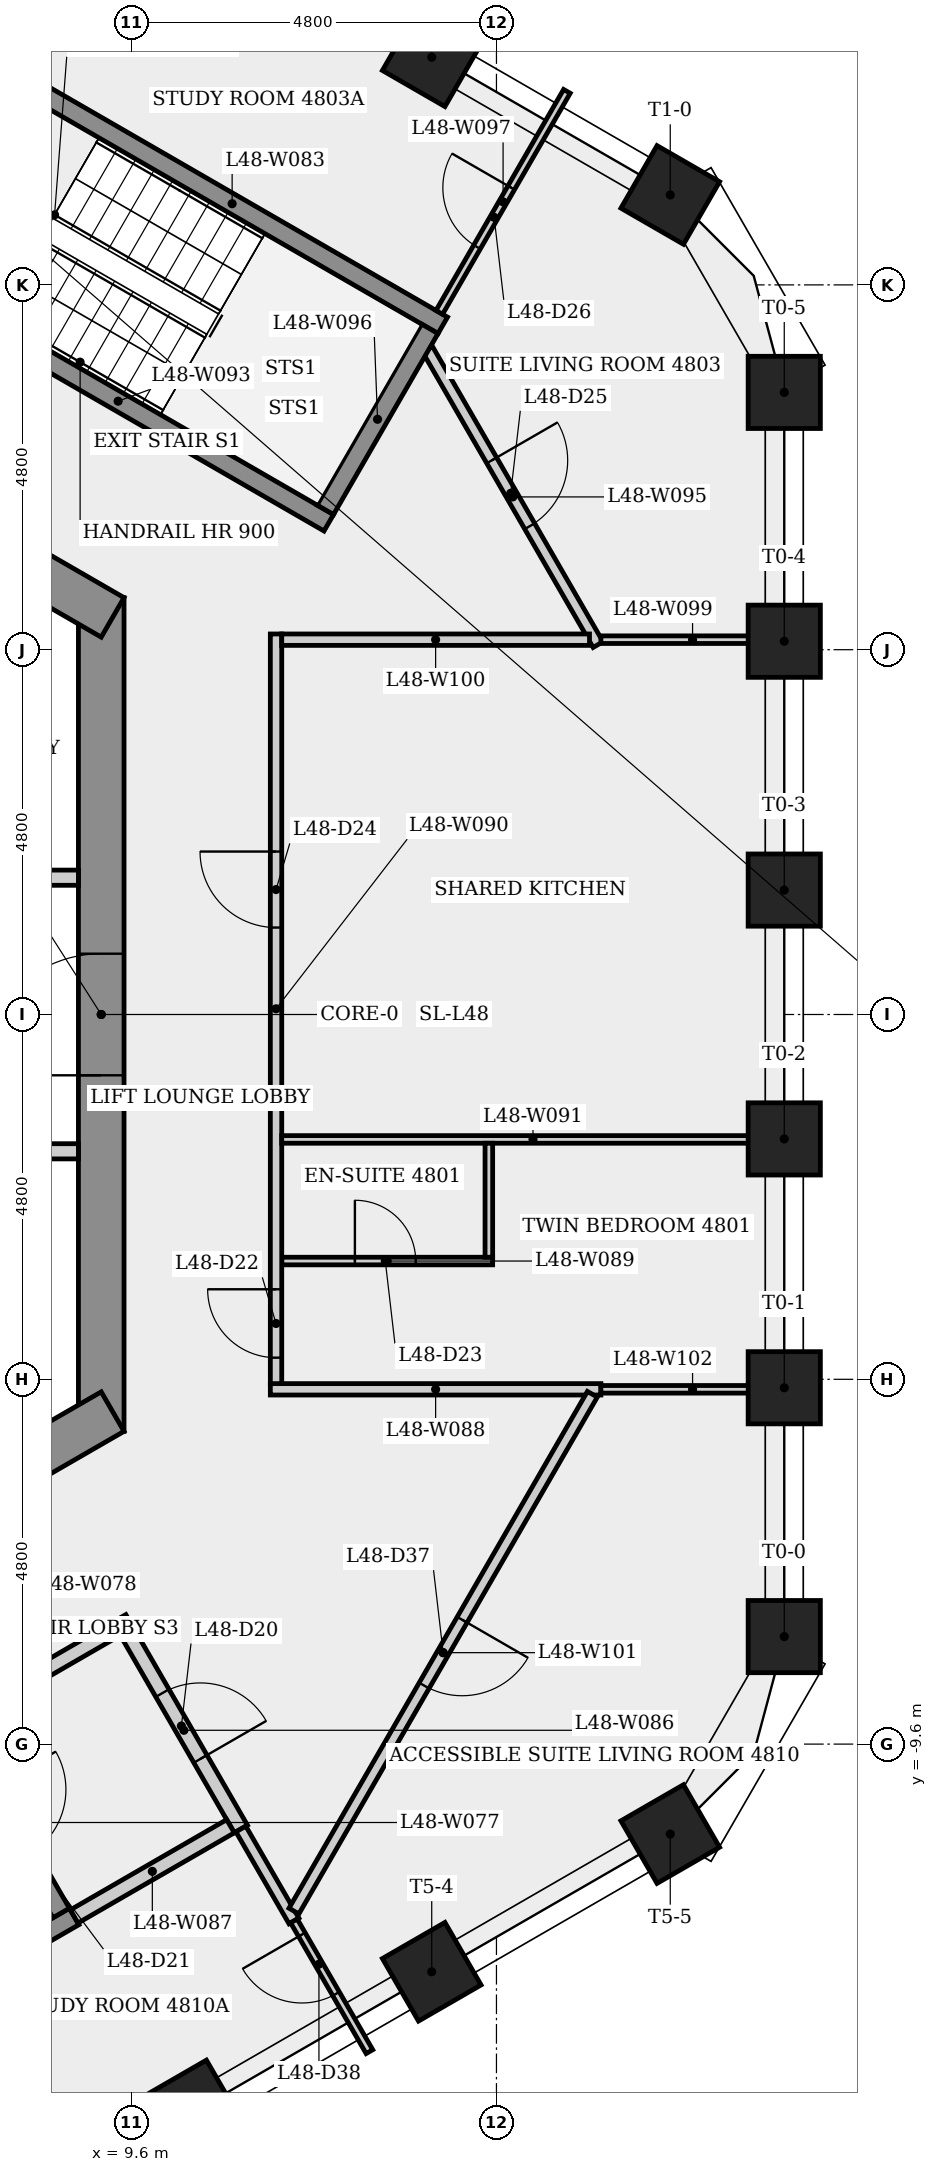
"""IFC4 building model, lengths in metres.
Left out: names, types, materials, properties, quantities, classifications, styles, units other than length and angle.
Written with IfcOpenShell. Run it as: python <this file> out.ifc"""

import sys

from ifc_helpers import new_model, si_unit, direction, frame, frame_2d, origin, origin_2d, place, context, subcontext, project, spatial, rectangle, extrude, element, fill, save


model = new_model("IFC4")
c1 = context("Model", 3, precision=1e-05, world=origin(), true_north=direction((0.0, 1.0)))
c2 = subcontext(c1, "Body", "Model", "MODEL_VIEW")
j1 = project(units=[si_unit("LENGTHUNIT", "METRE"), si_unit("PLANEANGLEUNIT", "RADIAN")], contexts=[c1])
p1 = place(None, origin())
s1 = spatial("IfcSite", under=j1, at=p1, CompositionType="ELEMENT")
p2 = place(p1, origin())
s2 = spatial("IfcBuilding", under=s1, at=p2, CompositionType="ELEMENT")
p3 = place(p2, frame((0.0, 0.0, 179.9)))
s3 = spatial("IfcBuildingStorey", under=s2, at=p3, CompositionType="ELEMENT", Elevation=179.9)
p4 = place(p3, frame((9.2, -5.485, 0.0), z_axis=(0.0, 0.0, 1.0), x_axis=(0.0, 1.0, 0.0)))
e1 = element("IfcWall", 1, at=p4, inside=s3, PredefinedType="SHEAR", context=c2, shape_type="SweptSolid", body=[
    extrude(rectangle(XDim=10.97, YDim=0.6, at=frame_2d((5.485, 0.0))), origin(), (0.0, 0.0, 1.0), 3.4),
])
p5 = place(p4, frame((4.685, 0.0, 0.0)))
e2 = element("IfcOpeningElement", 2, at=p5, cuts=e1, PredefinedType="OPENING", context=c2, shape_type="SweptSolid", body=[
    extrude(rectangle(XDim=1.6, YDim=2.1, at=frame_2d((0.8, 1.05))), frame((0.0, 0.31, 0.0), z_axis=(0.0, -1.0, 0.0), x_axis=(1.0, 0.0, 0.0)), (0.0, 0.0, 1.0), 0.62),
])
p6 = place(p3, frame((9.35, 5.225, 0.0), z_axis=(0.0, 0.0, 1.0), x_axis=(-0.866023993627, 0.500002442456, 0.0)))
e3 = element("IfcWall", 3, at=p6, inside=s3, PredefinedType="SHEAR", context=c2, shape_type="SweptSolid", body=[
    extrude(rectangle(XDim=10.97, YDim=0.6, at=frame_2d((5.485, 0.0))), origin(), (0.0, 0.0, 1.0), 3.4),
])
p7 = place(p6, frame((8.325, 0.0, 0.0)))
e4 = element("IfcOpeningElement", 4, at=p7, cuts=e3, PredefinedType="OPENING", context=c2, shape_type="SweptSolid", body=[
    extrude(rectangle(XDim=0.9, YDim=2.1, at=frame_2d((0.45, 1.05))), frame((0.0, 0.31, 0.0), z_axis=(0.0, -1.0, 0.0), x_axis=(1.0, 0.0, 0.0)), (0.0, 0.0, 1.0), 0.62),
])
p8 = place(p6, frame((1.518, 0.0, 0.0)))
e5 = element("IfcOpeningElement", 5, at=p8, cuts=e3, PredefinedType="OPENING", context=c2, shape_type="SweptSolid", body=[
    extrude(rectangle(XDim=0.9, YDim=2.1, at=frame_2d((0.45, 1.05))), frame((0.0, 0.31, 0.0), z_axis=(0.0, -1.0, 0.0), x_axis=(1.0, 0.0, 0.0)), (0.0, 0.0, 1.0), 0.62),
])
p9 = place(p3, frame((-0.15, -10.71, 0.0), z_axis=(0.0, 0.0, 1.0), x_axis=(0.866023993627, 0.500002442456, 0.0)))
e6 = element("IfcWall", 6, at=p9, inside=s3, PredefinedType="SHEAR", context=c2, shape_type="SweptSolid", body=[
    extrude(rectangle(XDim=10.97, YDim=0.6, at=frame_2d((5.485, 0.0))), origin(), (0.0, 0.0, 1.0), 3.4),
])
p10 = place(p9, frame((1.283, 0.0, 0.0)))
e7 = element("IfcOpeningElement", 7, at=p10, cuts=e6, PredefinedType="OPENING", context=c2, shape_type="SweptSolid", body=[
    extrude(rectangle(XDim=0.9, YDim=2.1, at=frame_2d((0.45, 1.05))), frame((0.0, 0.31, 0.0), z_axis=(0.0, -1.0, 0.0), x_axis=(1.0, 0.0, 0.0)), (0.0, 0.0, 1.0), 0.62),
])
p11 = place(p9, frame((8.09, 0.0, 0.0)))
e8 = element("IfcOpeningElement", 8, at=p11, cuts=e6, PredefinedType="OPENING", context=c2, shape_type="SweptSolid", body=[
    extrude(rectangle(XDim=0.9, YDim=2.1, at=frame_2d((0.45, 1.05))), frame((0.0, 0.31, 0.0), z_axis=(0.0, -1.0, 0.0), x_axis=(1.0, 0.0, 0.0)), (0.0, 0.0, 1.0), 0.62),
])
for number, where, z_axis, x_axis in (
    (9, (18.187, -8.186, 0.0), (0.0, 0.0, 1.0), (1.0, 0.0, 0.0)),
    (10, (18.187, -4.911, 0.0), (0.0, 0.0, 1.0), (1.0, 0.0, 0.0)),
    (11, (18.187, -1.637, 0.0), (0.0, 0.0, 1.0), (1.0, 0.0, 0.0)),
    (12, (18.187, 1.637, 0.0), (0.0, 0.0, 1.0), (1.0, 0.0, 0.0)),
    (13, (18.187, 4.911, 0.0), (0.0, 0.0, 1.0), (1.0, 0.0, 0.0)),
    (14, (18.187, 8.186, 0.0), (0.0, 0.0, 1.0), (1.0, 0.0, 0.0)),
    (15, (16.687, 10.783, 0.0), (0.0, 0.0, 1.0), (0.5, 0.866, 0.0)),
    (16, (13.548, 12.595, 0.0), (0.0, 0.0, 1.0), (0.5, 0.866, 0.0)),
    (17, (10.41, -14.407, 0.0), (0.0, 0.0, 1.0), (0.5, -0.866, 0.0)),
    (18, (13.548, -12.595, 0.0), (0.0, 0.0, 1.0), (0.5, -0.866, 0.0)),
    (19, (16.687, -10.783, 0.0), (0.0, 0.0, 1.0), (0.5, -0.866, 0.0)),
):
    element("IfcColumn", number, at=place(p3, frame(where, z_axis=z_axis, x_axis=x_axis)), inside=s3, PredefinedType="COLUMN", context=c2, shape_type="SweptSolid", body=[
        extrude(rectangle(XDim=0.95, YDim=0.95, at=origin_2d()), origin(), (0.0, 0.0, 1.0), 3.4),
    ])
p12 = place(p3, frame((7.153, -12.989, 0.0), z_axis=(0.0, 0.0, 1.0), x_axis=(0.500009866947, -0.866019707025, 0.0)))
e20 = element("IfcWall", 20, at=p12, inside=s3, PredefinedType="PARTITIONING", context=c2, shape_type="SweptSolid", body=[
    extrude(rectangle(XDim=3.358, YDim=0.1, at=frame_2d((1.679, 0.0))), origin(), (0.0, 0.0, 1.0), 3.05),
])
p13 = place(p3, frame((3.301, -15.068, 0.0), z_axis=(0.0, 0.0, 1.0), x_axis=(0.866035036182, 0.499983315828, 0.0)))
e21 = element("IfcWall", 21, at=p13, inside=s3, PredefinedType="SHEAR", context=c2, shape_type="SweptSolid", body=[
    extrude(rectangle(XDim=6.4, YDim=0.25, at=frame_2d((3.2, 0.0))), origin(), (0.0, 0.0, 1.0), 3.05),
])
p14 = place(p3, frame((7.298, -9.441, 0.0), z_axis=(0.0, 0.0, 1.0), x_axis=(0.500034990121, -0.866005201286, 0.0)))
e22 = element("IfcWall", 22, at=p14, inside=s3, PredefinedType="SHEAR", context=c2, shape_type="SweptSolid", body=[
    extrude(rectangle(XDim=2.75, YDim=0.25, at=frame_2d((1.375, 0.0))), origin(), (0.0, 0.0, 1.0), 3.05),
])
p15 = place(p14, frame((0.875, 0.0, 0.0)))
e23 = element("IfcOpeningElement", 23, at=p15, cuts=e22, PredefinedType="OPENING", context=c2, shape_type="SweptSolid", body=[
    extrude(rectangle(XDim=1.0, YDim=2.1, at=frame_2d((0.5, 1.05))), frame((0.0, 0.135, 0.0), z_axis=(0.0, -1.0, 0.0), x_axis=(1.0, 0.0, 0.0)), (0.0, 0.0, 1.0), 0.27),
])
p16 = place(p3, frame((7.344, -9.27, 0.0), z_axis=(0.0, 0.0, 1.0), x_axis=(0.866005588531, 0.500034319456, 0.0)))
e24 = element("IfcWall", 24, at=p16, inside=s3, PredefinedType="PARTITIONING", context=c2, shape_type="SweptSolid", body=[
    extrude(rectangle(XDim=2.575, YDim=0.2, at=frame_2d((1.288, 0.0))), origin(), (0.0, 0.0, 1.0), 3.05),
])
p17 = place(p3, frame((7.475, 1.8, 0.0), z_axis=(0.0, 0.0, 1.0), x_axis=(1.0, 0.0, 0.0)))
e25 = element("IfcWall", 25, at=p17, inside=s3, PredefinedType="PARTITIONING", context=c2, shape_type="SweptSolid", body=[
    extrude(rectangle(XDim=1.425, YDim=0.2, at=frame_2d((0.712, 0.0))), origin(), (0.0, 0.0, 1.0), 3.05),
])
p18 = place(p3, frame((8.151, 12.268, 0.0), z_axis=(0.0, 0.0, 1.0), x_axis=(0.866025499775, -0.499999833739, 0.0)))
e26 = element("IfcWall", 26, at=p18, inside=s3, PredefinedType="SHEAR", context=c2, shape_type="SweptSolid", body=[
    extrude(rectangle(XDim=6.4, YDim=0.25, at=frame_2d((3.2, 0.0))), origin(), (0.0, 0.0, 1.0), 3.05),
])
p19 = place(p3, frame((8.9, -1.8, 0.0), z_axis=(0.0, 0.0, 1.0), x_axis=(-1.0, 0.0, 0.0)))
e27 = element("IfcWall", 27, at=p19, inside=s3, PredefinedType="PARTITIONING", context=c2, shape_type="SweptSolid", body=[
    extrude(rectangle(XDim=1.425, YDim=0.2, at=frame_2d((0.712, 0.0))), origin(), (0.0, 0.0, 1.0), 3.05),
])
p20 = place(p3, frame((9.537, -8.119, 0.0), z_axis=(0.0, 0.0, 1.0), x_axis=(0.499990139034, -0.866031096941, 0.0)))
e28 = element("IfcWall", 28, at=p20, inside=s3, PredefinedType="PARTITIONING", context=c2, shape_type="SweptSolid", body=[
    extrude(rectangle(XDim=3.0, YDim=0.2, at=frame_2d((1.5, 0.0))), origin(), (0.0, 0.0, 1.0), 3.05),
])
p21 = place(p20, frame((0.935, 0.0, 0.0)))
e29 = element("IfcOpeningElement", 29, at=p21, cuts=e28, PredefinedType="OPENING", context=c2, shape_type="SweptSolid", body=[
    extrude(rectangle(XDim=1.0, YDim=2.1, at=frame_2d((0.5, 1.05))), frame((0.0, 0.11, 0.0), z_axis=(0.0, -1.0, 0.0), x_axis=(1.0, 0.0, 0.0)), (0.0, 0.0, 1.0), 0.22),
])
p22 = place(p3, frame((10.901, -10.681, 0.0), z_axis=(0.0, 0.0, 1.0), x_axis=(-0.866007538022, -0.500030943131, 0.0)))
e30 = element("IfcWall", 30, at=p22, inside=s3, PredefinedType="PARTITIONING", context=c2, shape_type="SweptSolid", body=[
    extrude(rectangle(XDim=2.375, YDim=0.2, at=frame_2d((1.188, 0.0))), origin(), (0.0, 0.0, 1.0), 3.05),
])
p23 = place(p3, frame((11.425, -4.932, 0.0), z_axis=(0.0, 0.0, 1.0), x_axis=(1.0, 0.0, 0.0)))
e31 = element("IfcWall", 31, at=p23, inside=s3, PredefinedType="PARTITIONING", context=c2, shape_type="SweptSolid", body=[
    extrude(rectangle(XDim=4.349, YDim=0.15, at=frame_2d((2.175, 0.0))), origin(), (0.0, 0.0, 1.0), 3.05),
])
p24 = place(p3, frame((11.575, -3.244, 0.0), z_axis=(0.0, 0.0, 1.0), x_axis=(1.0, 0.0, 0.0)))
e32 = element("IfcWall", 32, at=p24, inside=s3, PredefinedType="PARTITIONING", context=c2, shape_type="SweptSolid", body=[
    extrude(rectangle(XDim=2.775, YDim=0.1, at=frame_2d((1.388, 0.0))), origin(), (0.0, 0.0, 1.0), 3.05),
])
p25 = place(p24, frame((0.962, 0.0, 0.0)))
e33 = element("IfcOpeningElement", 33, at=p25, cuts=e32, PredefinedType="OPENING", context=c2, shape_type="SweptSolid", body=[
    extrude(rectangle(XDim=0.8, YDim=2.1, at=frame_2d((0.4, 1.05))), frame((0.0, 0.06, 0.0), z_axis=(0.0, -1.0, 0.0), x_axis=(1.0, 0.0, 0.0)), (0.0, 0.0, 1.0), 0.12),
])
p26 = place(p3, frame((11.5, -4.857, 0.0), z_axis=(0.0, 0.0, 1.0), x_axis=(0.0, 1.0, 0.0)))
e34 = element("IfcWall", 34, at=p26, inside=s3, PredefinedType="PARTITIONING", context=c2, shape_type="SweptSolid", body=[
    extrude(rectangle(XDim=9.864, YDim=0.15, at=frame_2d((4.932, 0.0))), origin(), (0.0, 0.0, 1.0), 3.05),
])
p27 = place(p26, frame((0.341, 0.0, 0.0)))
e35 = element("IfcOpeningElement", 35, at=p27, cuts=e34, PredefinedType="OPENING", context=c2, shape_type="SweptSolid", body=[
    extrude(rectangle(XDim=0.9, YDim=2.1, at=frame_2d((0.45, 1.05))), frame((0.0, 0.085, 0.0), z_axis=(0.0, -1.0, 0.0), x_axis=(1.0, 0.0, 0.0)), (0.0, 0.0, 1.0), 0.17),
])
p28 = place(p26, frame((6.001, 0.0, 0.0)))
e36 = element("IfcOpeningElement", 36, at=p28, cuts=e34, PredefinedType="OPENING", context=c2, shape_type="SweptSolid", body=[
    extrude(rectangle(XDim=1.0, YDim=2.1, at=frame_2d((0.5, 1.05))), frame((0.0, 0.085, 0.0), z_axis=(0.0, -1.0, 0.0), x_axis=(1.0, 0.0, 0.0)), (0.0, 0.0, 1.0), 0.17),
])
p29 = place(p3, frame((11.575, -1.644, 0.0), z_axis=(0.0, 0.0, 1.0), x_axis=(1.0, 0.0, 0.0)))
e37 = element("IfcWall", 37, at=p29, inside=s3, PredefinedType="PARTITIONING", context=c2, shape_type="SweptSolid", body=[
    extrude(rectangle(XDim=6.612, YDim=0.1, at=frame_2d((3.306, 0.0))), origin(), (0.0, 0.0, 1.0), 3.05),
])
p30 = place(p3, frame((11.736, -11.927, 0.0), z_axis=(0.0, 0.0, 1.0), x_axis=(-0.499898978922, 0.866083720475, 0.0)))
e38 = element("IfcWall", 38, at=p30, inside=s3, PredefinedType="PARTITIONING", context=c2, shape_type="SweptSolid", body=[
    extrude(rectangle(XDim=1.397, YDim=0.15, at=frame_2d((0.698, 0.0))), origin(), (0.0, 0.0, 1.0), 3.05),
])
p31 = place(p3, frame((12.194, 6.47, 0.0), z_axis=(0.0, 0.0, 1.0), x_axis=(-0.866025499775, 0.499999833739, 0.0)))
e39 = element("IfcWall", 39, at=p31, inside=s3, PredefinedType="SHEAR", context=c2, shape_type="SweptSolid", body=[
    extrude(rectangle(XDim=6.4, YDim=0.25, at=frame_2d((3.2, 0.0))), origin(), (0.0, 0.0, 1.0), 3.05),
])
p32 = place(p31, frame((5.25, 0.0, 0.0)))
e40 = element("IfcOpeningElement", 40, at=p32, cuts=e39, PredefinedType="OPENING", context=c2, shape_type="SweptSolid", body=[
    extrude(rectangle(XDim=1.0, YDim=2.1, at=frame_2d((0.5, 1.05))), frame((0.0, 0.135, 0.0), z_axis=(0.0, -1.0, 0.0), x_axis=(1.0, 0.0, 0.0)), (0.0, 0.0, 1.0), 0.27),
])
p33 = place(p3, frame((12.729, -13.647, 0.0), z_axis=(0.0, 0.0, 1.0), x_axis=(-0.50005230485, 0.865995203459, 0.0)))
e41 = element("IfcWall", 41, at=p33, inside=s3, PredefinedType="PARTITIONING", context=c2, shape_type="SweptSolid", body=[
    extrude(rectangle(XDim=1.986, YDim=0.1, at=frame_2d((0.993, 0.0))), origin(), (0.0, 0.0, 1.0), 3.05),
])
p34 = place(p33, frame((0.878, 0.0, 0.0)))
e42 = element("IfcOpeningElement", 42, at=p34, cuts=e41, PredefinedType="OPENING", context=c2, shape_type="SweptSolid", body=[
    extrude(rectangle(XDim=0.9, YDim=2.1, at=frame_2d((0.45, 1.05))), frame((0.0, 0.06, 0.0), z_axis=(0.0, -1.0, 0.0), x_axis=(1.0, 0.0, 0.0)), (0.0, 0.0, 1.0), 0.12),
])
p35 = place(p3, frame((13.493, 8.753, 0.0), z_axis=(0.0, 0.0, 1.0), x_axis=(0.500047370938, -0.865998052433, 0.0)))
e43 = element("IfcWall", 43, at=p35, inside=s3, PredefinedType="PARTITIONING", context=c2, shape_type="SweptSolid", body=[
    extrude(rectangle(XDim=4.488, YDim=0.15, at=frame_2d((2.244, 0.0))), origin(), (0.0, 0.0, 1.0), 3.05),
])
p36 = place(p35, frame((1.689, 0.0, 0.0)))
e44 = element("IfcOpeningElement", 44, at=p36, cuts=e43, PredefinedType="OPENING", context=c2, shape_type="SweptSolid", body=[
    extrude(rectangle(XDim=1.0, YDim=2.1, at=frame_2d((0.5, 1.05))), frame((0.0, 0.085, 0.0), z_axis=(0.0, -1.0, 0.0), x_axis=(1.0, 0.0, 0.0)), (0.0, 0.0, 1.0), 0.17),
])
p37 = place(p3, frame((12.148, 6.641, 0.0), z_axis=(0.0, 0.0, 1.0), x_axis=(0.500034990121, 0.866005201286, 0.0)))
e45 = element("IfcWall", 45, at=p37, inside=s3, PredefinedType="SHEAR", context=c2, shape_type="SweptSolid", body=[
    extrude(rectangle(XDim=2.75, YDim=0.25, at=frame_2d((1.375, 0.0))), origin(), (0.0, 0.0, 1.0), 3.05),
])
p38 = place(p3, frame((13.648, 9.239, 0.0), z_axis=(0.0, 0.0, 1.0), x_axis=(0.500064393924, 0.865988222743, 0.0)))
e46 = element("IfcWall", 46, at=p38, inside=s3, PredefinedType="PARTITIONING", context=c2, shape_type="SweptSolid", body=[
    extrude(rectangle(XDim=3.358, YDim=0.1, at=frame_2d((1.679, 0.0))), origin(), (0.0, 0.0, 1.0), 3.05),
])
p39 = place(p38, frame((0.993, 0.0, 0.0)))
e47 = element("IfcOpeningElement", 47, at=p39, cuts=e46, PredefinedType="OPENING", context=c2, shape_type="SweptSolid", body=[
    extrude(rectangle(XDim=0.9, YDim=2.1, at=frame_2d((0.45, 1.05))), frame((0.0, 0.06, 0.0), z_axis=(0.0, -1.0, 0.0), x_axis=(1.0, 0.0, 0.0)), (0.0, 0.0, 1.0), 0.12),
])
p40 = place(p3, frame((14.3, -3.194, 0.0), z_axis=(0.0, 0.0, 1.0), x_axis=(0.0, 1.0, 0.0)))
e48 = element("IfcWall", 48, at=p40, inside=s3, PredefinedType="PARTITIONING", context=c2, shape_type="SweptSolid", body=[
    extrude(rectangle(XDim=1.5, YDim=0.1, at=frame_2d((0.75, 0.0))), origin(), (0.0, 0.0, 1.0), 3.05),
])
p41 = place(p3, frame((15.774, 4.932, 0.0), z_axis=(0.0, 0.0, 1.0), x_axis=(1.0, 0.0, 0.0)))
e49 = element("IfcWall", 49, at=p41, inside=s3, PredefinedType="PARTITIONING", context=c2, shape_type="SweptSolid", body=[
    extrude(rectangle(XDim=2.413, YDim=0.1, at=frame_2d((1.206, 0.0))), origin(), (0.0, 0.0, 1.0), 3.05),
])
p42 = place(p3, frame((15.624, 4.932, 0.0), z_axis=(0.0, 0.0, 1.0), x_axis=(-1.0, 0.0, 0.0)))
e50 = element("IfcWall", 50, at=p42, inside=s3, PredefinedType="PARTITIONING", context=c2, shape_type="SweptSolid", body=[
    extrude(rectangle(XDim=4.049, YDim=0.15, at=frame_2d((2.025, 0.0))), origin(), (0.0, 0.0, 1.0), 3.05),
])
p43 = place(p3, frame((15.662, -4.997, 0.0), z_axis=(0.0, 0.0, 1.0), x_axis=(-0.500001468015, -0.866024556224, 0.0)))
e51 = element("IfcWall", 51, at=p43, inside=s3, PredefinedType="PARTITIONING", context=c2, shape_type="SweptSolid", body=[
    extrude(rectangle(XDim=7.852, YDim=0.15, at=frame_2d((3.926, 0.0))), origin(), (0.0, 0.0, 1.0), 3.05),
])
p44 = place(p43, frame((3.426, 0.0, 0.0)))
e52 = element("IfcOpeningElement", 52, at=p44, cuts=e51, PredefinedType="OPENING", context=c2, shape_type="SweptSolid", body=[
    extrude(rectangle(XDim=1.0, YDim=2.1, at=frame_2d((0.5, 1.05))), frame((0.0, 0.085, 0.0), z_axis=(0.0, -1.0, 0.0), x_axis=(1.0, 0.0, 0.0)), (0.0, 0.0, 1.0), 0.17),
])
p45 = place(p3, frame((18.187, -4.932, 0.0), z_axis=(0.0, 0.0, 1.0), x_axis=(-1.0, 0.0, 0.0)))
e53 = element("IfcWall", 53, at=p45, inside=s3, PredefinedType="PARTITIONING", context=c2, shape_type="SweptSolid", body=[
    extrude(rectangle(XDim=2.413, YDim=0.1, at=frame_2d((1.206, 0.0))), origin(), (0.0, 0.0, 1.0), 3.05),
])
p46 = place(p21, origin())
e54 = element("IfcDoor", 54, at=p46, inside=s3, OperationType="SINGLE_SWING_RIGHT", PredefinedType="DOOR", context=c2, shape_type="SweptSolid", body=[
    extrude(rectangle(XDim=1.0, YDim=2.1, at=frame_2d((0.5, 1.05))), frame((0.0, 0.025, 0.0), z_axis=(0.0, -1.0, 0.0), x_axis=(1.0, 0.0, 0.0)), (0.0, 0.0, 1.0), 0.05),
])
fill(e29, e54)
p47 = place(p27, origin())
e55 = element("IfcDoor", 55, at=p47, inside=s3, OperationType="SINGLE_SWING_RIGHT", PredefinedType="DOOR", context=c2, shape_type="SweptSolid", body=[
    extrude(rectangle(XDim=0.9, YDim=2.1, at=frame_2d((0.45, 1.05))), frame((0.0, 0.025, 0.0), z_axis=(0.0, -1.0, 0.0), x_axis=(1.0, 0.0, 0.0)), (0.0, 0.0, 1.0), 0.05),
])
fill(e35, e55)
p48 = place(p25, origin())
e56 = element("IfcDoor", 56, at=p48, inside=s3, OperationType="SINGLE_SWING_LEFT", PredefinedType="DOOR", context=c2, shape_type="SweptSolid", body=[
    extrude(rectangle(XDim=0.8, YDim=2.1, at=frame_2d((0.4, 1.05))), frame((0.0, 0.025, 0.0), z_axis=(0.0, -1.0, 0.0), x_axis=(1.0, 0.0, 0.0)), (0.0, 0.0, 1.0), 0.05),
])
fill(e33, e56)
p49 = place(p28, origin())
e57 = element("IfcDoor", 57, at=p49, inside=s3, OperationType="SINGLE_SWING_RIGHT", PredefinedType="DOOR", context=c2, shape_type="SweptSolid", body=[
    extrude(rectangle(XDim=1.0, YDim=2.1, at=frame_2d((0.5, 1.05))), frame((0.0, 0.025, 0.0), z_axis=(0.0, -1.0, 0.0), x_axis=(1.0, 0.0, 0.0)), (0.0, 0.0, 1.0), 0.05),
])
fill(e36, e57)
p50 = place(p36, origin())
e58 = element("IfcDoor", 58, at=p50, inside=s3, OperationType="SINGLE_SWING_LEFT", PredefinedType="DOOR", context=c2, shape_type="SweptSolid", body=[
    extrude(rectangle(XDim=1.0, YDim=2.1, at=frame_2d((0.5, 1.05))), frame((0.0, 0.025, 0.0), z_axis=(0.0, -1.0, 0.0), x_axis=(1.0, 0.0, 0.0)), (0.0, 0.0, 1.0), 0.05),
])
fill(e44, e58)
p51 = place(p39, origin())
e59 = element("IfcDoor", 59, at=p51, inside=s3, OperationType="SINGLE_SWING_RIGHT", PredefinedType="DOOR", context=c2, shape_type="SweptSolid", body=[
    extrude(rectangle(XDim=0.9, YDim=2.1, at=frame_2d((0.45, 1.05))), frame((0.0, 0.025, 0.0), z_axis=(0.0, -1.0, 0.0), x_axis=(1.0, 0.0, 0.0)), (0.0, 0.0, 1.0), 0.05),
])
fill(e47, e59)
p52 = place(p44, origin())
e60 = element("IfcDoor", 60, at=p52, inside=s3, OperationType="SINGLE_SWING_LEFT", PredefinedType="DOOR", context=c2, shape_type="SweptSolid", body=[
    extrude(rectangle(XDim=1.0, YDim=2.1, at=frame_2d((0.5, 1.05))), frame((0.0, 0.025, 0.0), z_axis=(0.0, -1.0, 0.0), x_axis=(1.0, 0.0, 0.0)), (0.0, 0.0, 1.0), 0.05),
])
fill(e52, e60)
p53 = place(p34, origin())
e61 = element("IfcDoor", 61, at=p53, inside=s3, OperationType="SINGLE_SWING_RIGHT", PredefinedType="DOOR", context=c2, shape_type="SweptSolid", body=[
    extrude(rectangle(XDim=0.9, YDim=2.1, at=frame_2d((0.45, 1.05))), frame((0.0, 0.025, 0.0), z_axis=(0.0, -1.0, 0.0), x_axis=(1.0, 0.0, 0.0)), (0.0, 0.0, 1.0), 0.05),
])
fill(e42, e61)
p54 = place(p5, origin())
e62 = element("IfcDoor", 62, at=p54, inside=s3, OperationType="SINGLE_SWING_LEFT", PredefinedType="DOOR", context=c2, shape_type="SweptSolid", body=[
    extrude(rectangle(XDim=1.6, YDim=2.1, at=frame_2d((0.8, 1.05))), frame((0.0, 0.025, 0.0), z_axis=(0.0, -1.0, 0.0), x_axis=(1.0, 0.0, 0.0)), (0.0, 0.0, 1.0), 0.05),
])
fill(e2, e62)
save(model, sys.argv[1])
